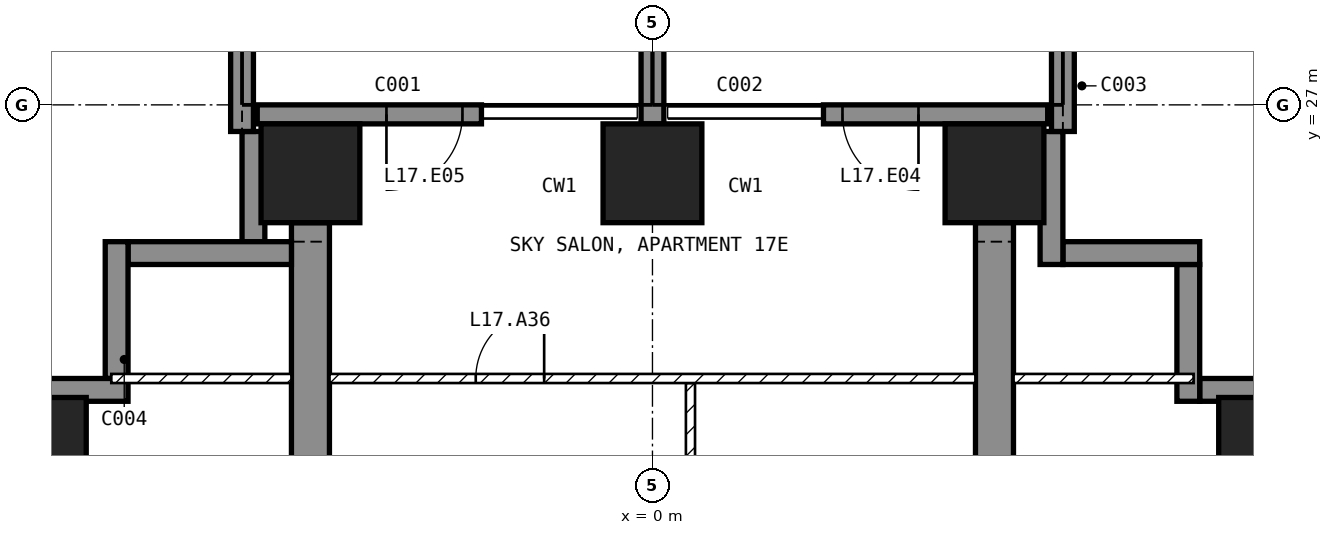
"""IFC4 building model, lengths in metres.
Left out: names, types, materials, properties, quantities, classifications, styles, units other than length and angle.
Written with IfcOpenShell. Run it as: python <this file> out.ifc"""

import sys

from ifc_helpers import new_model, si_unit, direction, frame, frame_2d, origin, origin_2d, place, context, subcontext, project, spatial, polyline, rectangle, outline, extrude, element, fill, save


model = new_model("IFC4")
c1 = context("Model", 3, precision=1e-05, world=origin(), true_north=direction((0.0, 1.0)))
c2 = subcontext(c1, "Body", "Model", "MODEL_VIEW")
j1 = project(units=[si_unit("LENGTHUNIT", "METRE"), si_unit("PLANEANGLEUNIT", "RADIAN")], contexts=[c1])
p1 = place(None, origin())
s1 = spatial("IfcSite", under=j1, at=p1, CompositionType="ELEMENT")
p2 = place(p1, origin())
s2 = spatial("IfcBuilding", under=s1, at=p2, CompositionType="ELEMENT")
p3 = place(p2, frame((0.0, 0.0, 78.5)))
s3 = spatial("IfcBuildingStorey", under=s2, at=p3, CompositionType="ELEMENT", Elevation=78.5)
for number, where, z_axis, x_axis in (
    (1, (-8.1, 22.5, -0.25), (0.0, 0.0, 1.0), (1.0, 0.0, 0.0)),
    (2, (-4.5, 26.1, -0.25), (0.0, 0.0, 1.0), (1.0, 0.0, 0.0)),
    (3, (0.0, 26.1, -0.25), (0.0, 0.0, 1.0), (1.0, 0.0, 0.0)),
    (4, (4.5, 26.1, -0.25), (0.0, 0.0, 1.0), (1.0, 0.0, 0.0)),
    (5, (8.1, 22.5, -0.25), (0.0, 0.0, 1.0), (1.0, 0.0, 0.0)),
):
    element("IfcColumn", number, at=place(p3, frame(where, z_axis=z_axis, x_axis=x_axis)), inside=s3, PredefinedType="COLUMN", context=c2, shape_type="SweptSolid", body=[
        extrude(rectangle(XDim=1.3, YDim=1.3, at=origin_2d()), origin(), (0.0, 0.0, 1.0), 3.5),
    ])
for number, where, z_axis, x_axis in (
    (6, (-4.75, 9.0, -0.25), (1.0, 0.0, 0.0), (0.0, 1.0, 0.0)),
    (7, (4.25, 9.0, -0.25), (1.0, 0.0, 0.0), (0.0, 1.0, 0.0)),
):
    element("IfcWall", number, at=place(p3, frame(where, z_axis=z_axis, x_axis=x_axis)), inside=s3, PredefinedType="SHEAR", context=c2, shape_type="SweptSolid", body=[
        extrude(outline(polyline([(0.0, 0.0), (2.1, 0.0), (2.1, 2.65), (4.5, 2.65), (4.5, 0.0), (9.9, 0.0), (9.9, 2.65), (12.3, 2.65), (12.3, 0.0), (16.45, 0.0), (16.45, 3.5), (0.0, 3.5), (0.0, 0.0)])), origin(), (0.0, 0.0, 1.0), 0.5),
    ])
p4 = place(p3, frame((5.2, 26.875, 0.0), z_axis=(0.0, 0.0, 1.0), x_axis=(-1.0, 0.0, 0.0)))
e8 = element("IfcWall", 8, at=p4, inside=s3, PredefinedType="SOLIDWALL", context=c2, shape_type="SweptSolid", body=[
    extrude(rectangle(XDim=2.95, YDim=0.25, at=frame_2d((1.475, 0.0))), origin(), (0.0, 0.0, 1.0), 3.25),
])
p5 = place(p4, frame((1.7, 0.0, 0.0)))
e9 = element("IfcOpeningElement", 9, at=p5, cuts=e8, PredefinedType="OPENING", context=c2, shape_type="SweptSolid", body=[
    extrude(rectangle(XDim=1.0, YDim=2.4, at=frame_2d((0.5, 1.2))), frame((0.0, 0.135, 0.0), z_axis=(0.0, -1.0, 0.0), x_axis=(1.0, 0.0, 0.0)), (0.0, 0.0, 1.0), 0.27),
])
p6 = place(p3, frame((-2.25, 26.875, 0.0), z_axis=(0.0, 0.0, 1.0), x_axis=(-1.0, 0.0, 0.0)))
e10 = element("IfcWall", 10, at=p6, inside=s3, PredefinedType="SOLIDWALL", context=c2, shape_type="SweptSolid", body=[
    extrude(rectangle(XDim=2.95, YDim=0.25, at=frame_2d((1.475, 0.0))), origin(), (0.0, 0.0, 1.0), 3.25),
])
p7 = place(p6, frame((0.25, 0.0, 0.0)))
e11 = element("IfcOpeningElement", 11, at=p7, cuts=e10, PredefinedType="OPENING", context=c2, shape_type="SweptSolid", body=[
    extrude(rectangle(XDim=1.0, YDim=2.4, at=frame_2d((0.5, 1.2))), frame((0.0, 0.135, 0.0), z_axis=(0.0, -1.0, 0.0), x_axis=(1.0, 0.0, 0.0)), (0.0, 0.0, 1.0), 0.27),
])
p8 = place(p3, frame((8.65, 23.25, 0.0), z_axis=(0.0, 0.0, 1.0), x_axis=(-1.0, 0.0, 0.0)))
e12 = element("IfcWall", 12, at=p8, inside=s3, PredefinedType="SOLIDWALL", context=c2, shape_type="SweptSolid", body=[
    extrude(rectangle(XDim=1.45, YDim=0.3, at=frame_2d((0.725, 0.0))), origin(), (0.0, 0.0, 1.0), 3.25),
])
p9 = place(p3, frame((7.05, 23.1, 0.0), z_axis=(0.0, 0.0, 1.0), x_axis=(0.0, 1.0, 0.0)))
e13 = element("IfcWall", 13, at=p9, inside=s3, PredefinedType="SOLIDWALL", context=c2, shape_type="SweptSolid", body=[
    extrude(rectangle(XDim=1.8, YDim=0.3, at=frame_2d((0.9, 0.0))), origin(), (0.0, 0.0, 1.0), 3.25),
])
p10 = place(p3, frame((7.2, 25.05, 0.0), z_axis=(0.0, 0.0, 1.0), x_axis=(-1.0, 0.0, 0.0)))
e14 = element("IfcWall", 14, at=p10, inside=s3, PredefinedType="SOLIDWALL", context=c2, shape_type="SweptSolid", body=[
    extrude(rectangle(XDim=1.8, YDim=0.3, at=frame_2d((0.9, 0.0))), origin(), (0.0, 0.0, 1.0), 3.25),
])
p11 = place(p3, frame((5.25, 24.9, 0.0), z_axis=(0.0, 0.0, 1.0), x_axis=(0.0, 1.0, 0.0)))
e15 = element("IfcWall", 15, at=p11, inside=s3, PredefinedType="SOLIDWALL", context=c2, shape_type="SweptSolid", body=[
    extrude(rectangle(XDim=1.75, YDim=0.3, at=frame_2d((0.875, 0.0))), origin(), (0.0, 0.0, 1.0), 3.25),
])
p12 = place(p3, frame((-5.25, 26.65, 0.0), z_axis=(0.0, 0.0, 1.0), x_axis=(0.0, -1.0, 0.0)))
e16 = element("IfcWall", 16, at=p12, inside=s3, PredefinedType="SOLIDWALL", context=c2, shape_type="SweptSolid", body=[
    extrude(rectangle(XDim=1.45, YDim=0.3, at=frame_2d((0.725, 0.0))), origin(), (0.0, 0.0, 1.0), 3.25),
])
p13 = place(p3, frame((-4.75, 25.05, 0.0), z_axis=(0.0, 0.0, 1.0), x_axis=(-1.0, 0.0, 0.0)))
e17 = element("IfcWall", 17, at=p13, inside=s3, PredefinedType="SOLIDWALL", context=c2, shape_type="SweptSolid", body=[
    extrude(rectangle(XDim=2.15, YDim=0.3, at=frame_2d((1.075, 0.0))), origin(), (0.0, 0.0, 1.0), 3.25),
])
p14 = place(p3, frame((-7.05, 25.2, 0.0), z_axis=(0.0, 0.0, 1.0), x_axis=(0.0, -1.0, 0.0)))
e18 = element("IfcWall", 18, at=p14, inside=s3, PredefinedType="SOLIDWALL", context=c2, shape_type="SweptSolid", body=[
    extrude(rectangle(XDim=1.8, YDim=0.3, at=frame_2d((0.9, 0.0))), origin(), (0.0, 0.0, 1.0), 3.25),
])
p15 = place(p3, frame((-6.9, 23.25, 0.0), z_axis=(0.0, 0.0, 1.0), x_axis=(-1.0, 0.0, 0.0)))
e19 = element("IfcWall", 19, at=p15, inside=s3, PredefinedType="SOLIDWALL", context=c2, shape_type="SweptSolid", body=[
    extrude(rectangle(XDim=1.75, YDim=0.3, at=frame_2d((0.875, 0.0))), origin(), (0.0, 0.0, 1.0), 3.25),
])
p16 = place(p3, frame((-5.4, 26.65, 0.0), z_axis=(0.0, 0.0, 1.0), x_axis=(0.0, 1.0, 0.0)))
e20 = element("IfcWall", 20, at=p16, inside=s3, PredefinedType="SOLIDWALL", context=c2, shape_type="SweptSolid", body=[
    extrude(rectangle(XDim=3.05, YDim=0.3, at=frame_2d((1.525, 0.0))), origin(), (0.0, 0.0, 1.0), 3.25),
])
p17 = place(p3, frame((0.0, 26.75, 0.0), z_axis=(0.0, 0.0, 1.0), x_axis=(0.0, 1.0, 0.0)))
e21 = element("IfcWall", 21, at=p17, inside=s3, PredefinedType="SOLIDWALL", context=c2, shape_type="SweptSolid", body=[
    extrude(rectangle(XDim=2.95, YDim=0.3, at=frame_2d((1.475, 0.0))), origin(), (0.0, 0.0, 1.0), 3.25),
])
p18 = place(p3, frame((5.4, 26.65, 0.0), z_axis=(0.0, 0.0, 1.0), x_axis=(0.0, 1.0, 0.0)))
e22 = element("IfcWall", 22, at=p18, inside=s3, PredefinedType="SOLIDWALL", context=c2, shape_type="SweptSolid", body=[
    extrude(rectangle(XDim=3.05, YDim=0.3, at=frame_2d((1.525, 0.0))), origin(), (0.0, 0.0, 1.0), 3.25),
])
p19 = place(p3, frame((0.5, 23.34, 0.0), z_axis=(0.0, 0.0, 1.0), x_axis=(0.0, -1.0, 0.0)))
e23 = element("IfcWall", 23, at=p19, inside=s3, PredefinedType="PARTITIONING", context=c2, shape_type="SweptSolid", body=[
    extrude(rectangle(XDim=4.38, YDim=0.12, at=frame_2d((2.19, 0.0))), origin(), (0.0, 0.0, 1.0), 3.25),
])
p20 = place(p19, frame((1.74, 0.0, 0.0)))
e24 = element("IfcOpeningElement", 24, at=p20, cuts=e23, PredefinedType="OPENING", context=c2, shape_type="SweptSolid", body=[
    extrude(rectangle(XDim=0.9, YDim=2.1, at=frame_2d((0.45, 1.05))), frame((0.0, 0.07, 0.0), z_axis=(0.0, -1.0, 0.0), x_axis=(1.0, 0.0, 0.0)), (0.0, 0.0, 1.0), 0.14),
])
p21 = place(p3, frame((-4.25, 23.4, 0.0), z_axis=(0.0, 0.0, 1.0), x_axis=(1.0, 0.0, 0.0)))
e25 = element("IfcWall", 25, at=p21, inside=s3, PredefinedType="PARTITIONING", context=c2, shape_type="SweptSolid", body=[
    extrude(rectangle(XDim=8.5, YDim=0.12, at=frame_2d((4.25, 0.0))), origin(), (0.0, 0.0, 1.0), 3.25),
])
p22 = place(p21, frame((1.925, 0.0, 0.0)))
e26 = element("IfcOpeningElement", 26, at=p22, cuts=e25, PredefinedType="OPENING", context=c2, shape_type="SweptSolid", body=[
    extrude(rectangle(XDim=0.9, YDim=2.1, at=frame_2d((0.45, 1.05))), frame((0.0, 0.07, 0.0), z_axis=(0.0, -1.0, 0.0), x_axis=(1.0, 0.0, 0.0)), (0.0, 0.0, 1.0), 0.14),
])
for number, where, z_axis, x_axis in (
    (27, (4.75, 23.4, 0.0), (0.0, 0.0, 1.0), (1.0, 0.0, 0.0)),
    (28, (-7.12, 23.4, 0.0), (0.0, 0.0, 1.0), (1.0, 0.0, 0.0)),
):
    element("IfcWall", number, at=place(p3, frame(where, z_axis=z_axis, x_axis=x_axis)), inside=s3, PredefinedType="PARTITIONING", context=c2, shape_type="SweptSolid", body=[
        extrude(rectangle(XDim=2.37, YDim=0.12, at=frame_2d((1.185, 0.0))), origin(), (0.0, 0.0, 1.0), 3.25),
    ])
p23 = place(p5, origin())
e29 = element("IfcDoor", 29, at=p23, inside=s3, OperationType="SINGLE_SWING_LEFT", PredefinedType="DOOR", context=c2, shape_type="SweptSolid", body=[
    extrude(rectangle(XDim=1.0, YDim=2.4, at=frame_2d((0.5, 1.2))), frame((0.0, 0.025, 0.0), z_axis=(0.0, -1.0, 0.0), x_axis=(1.0, 0.0, 0.0)), (0.0, 0.0, 1.0), 0.05),
])
fill(e9, e29)
p24 = place(p7, origin())
e30 = element("IfcDoor", 30, at=p24, inside=s3, OperationType="SINGLE_SWING_RIGHT", PredefinedType="DOOR", context=c2, shape_type="SweptSolid", body=[
    extrude(rectangle(XDim=1.0, YDim=2.4, at=frame_2d((0.5, 1.2))), frame((0.0, 0.025, 0.0), z_axis=(0.0, -1.0, 0.0), x_axis=(1.0, 0.0, 0.0)), (0.0, 0.0, 1.0), 0.05),
])
fill(e11, e30)
p25 = place(p22, origin())
e31 = element("IfcDoor", 31, at=p25, inside=s3, OperationType="SINGLE_SWING_RIGHT", PredefinedType="DOOR", context=c2, shape_type="SweptSolid", body=[
    extrude(rectangle(XDim=0.9, YDim=2.1, at=frame_2d((0.45, 1.05))), frame((0.0, 0.025, 0.0), z_axis=(0.0, -1.0, 0.0), x_axis=(1.0, 0.0, 0.0)), (0.0, 0.0, 1.0), 0.05),
])
fill(e26, e31)
save(model, sys.argv[1])
